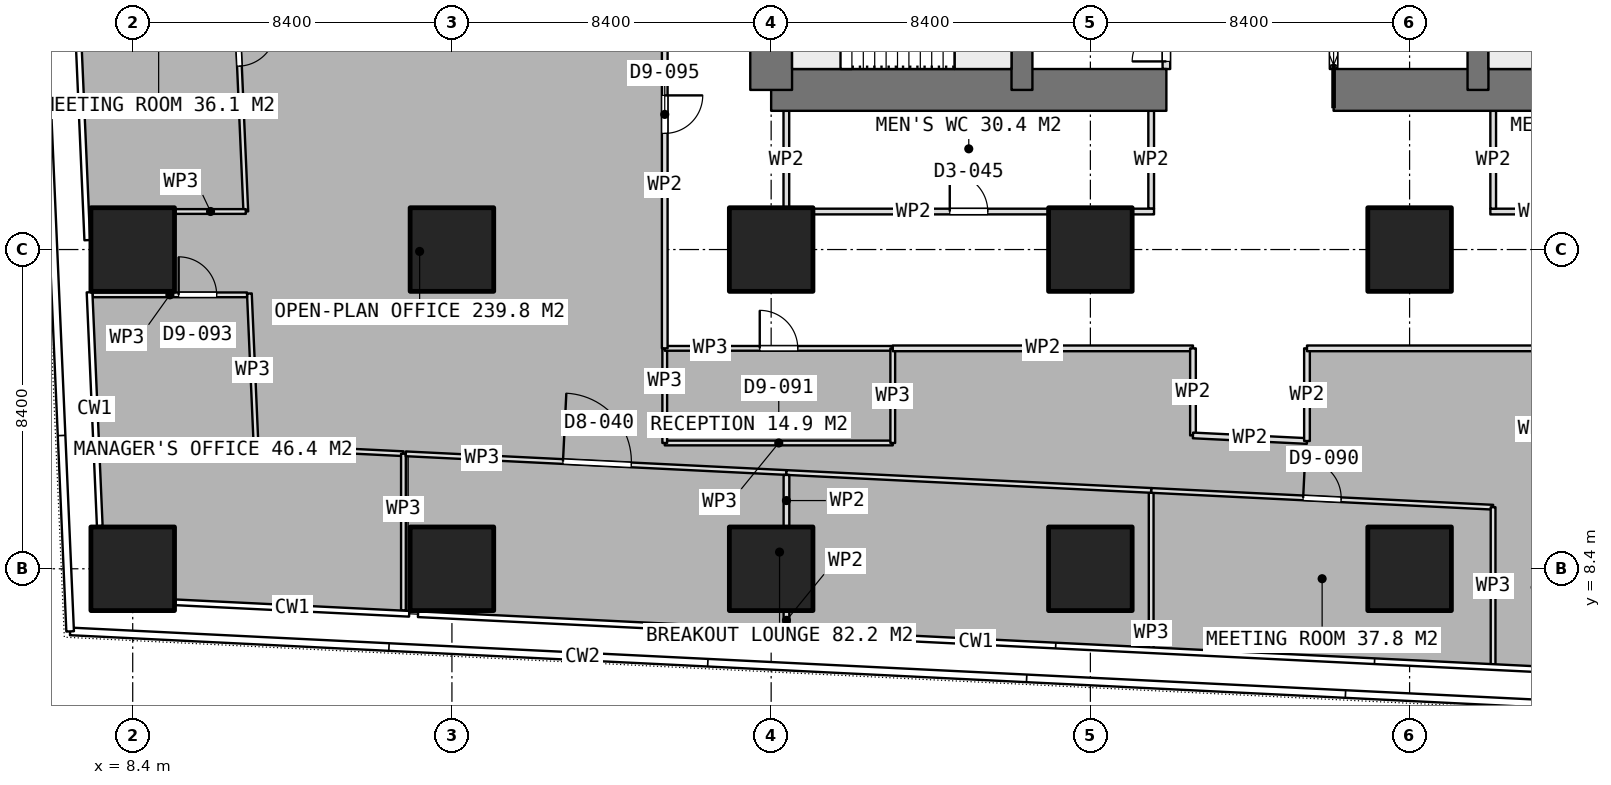
"""IFC4 building model, lengths in metres.
Left out: names, types, materials, properties, quantities, classifications, styles, units other than length and angle.
Written with IfcOpenShell. Run it as: python <this file> out.ifc"""

import sys

from ifc_helpers import new_model, si_unit, direction, frame, frame_2d, origin, origin_2d, place, context, subcontext, project, spatial, rectangle, extrude, element, fill, save


model = new_model("IFC4")
c1 = context("Model", 3, precision=1e-05, world=origin(), true_north=direction((0.0, 1.0)))
c2 = subcontext(c1, "Body", "Model", "MODEL_VIEW")
j1 = project(units=[si_unit("LENGTHUNIT", "METRE"), si_unit("PLANEANGLEUNIT", "RADIAN")], contexts=[c1])
p1 = place(None, origin())
s1 = spatial("IfcSite", under=j1, at=p1, CompositionType="ELEMENT")
p2 = place(p1, origin())
s2 = spatial("IfcBuilding", under=s1, at=p2, CompositionType="ELEMENT")
p3 = place(p2, frame((0.0, 0.0, 40.4)))
s3 = spatial("IfcBuildingStorey", under=s2, at=p3, CompositionType="ELEMENT", Elevation=40.4)
p4 = place(p3, frame((25.2, 21.0, 0.0), z_axis=(0.0, 0.0, 1.0), x_axis=(1.0, 0.0, 0.0)))
e1 = element("IfcWall", 1, at=p4, inside=s3, PredefinedType="SHEAR", context=c2, shape_type="SweptSolid", body=[
    extrude(rectangle(XDim=10.4, YDim=1.1, at=frame_2d((5.2, 0.0))), origin(), (0.0, 0.0, 1.0), 3.75),
])
p5 = place(p3, frame((40.0, 21.0, 0.0), z_axis=(0.0, 0.0, 1.0), x_axis=(1.0, 0.0, 0.0)))
e2 = element("IfcWall", 2, at=p5, inside=s3, PredefinedType="SHEAR", context=c2, shape_type="SweptSolid", body=[
    extrude(rectangle(XDim=10.4, YDim=1.1, at=frame_2d((5.2, 0.0))), origin(), (0.0, 0.0, 1.0), 3.75),
])
p6 = place(p3, frame((25.2, 21.0, 0.0), z_axis=(0.0, 0.0, 1.0), x_axis=(0.0, 1.0, 0.0)))
e3 = element("IfcWall", 3, at=p6, inside=s3, PredefinedType="SHEAR", context=c2, shape_type="SweptSolid", body=[
    extrude(rectangle(XDim=25.2, YDim=1.1, at=frame_2d((12.6, 0.0))), origin(), (0.0, 0.0, 1.0), 3.75),
])
p7 = place(p6, frame((7.8, 0.0, 0.0)))
e4 = element("IfcOpeningElement", 4, at=p7, cuts=e3, PredefinedType="OPENING", context=c2, shape_type="SweptSolid", body=[
    extrude(rectangle(XDim=1.2, YDim=2.1, at=frame_2d((0.6, 1.05))), frame((0.0, 0.56, 0.0), z_axis=(0.0, -1.0, 0.0), x_axis=(1.0, 0.0, 0.0)), (0.0, 0.0, 1.0), 1.12),
])
p8 = place(p6, frame((14.25, 0.0, 0.0)))
e5 = element("IfcOpeningElement", 5, at=p8, cuts=e3, PredefinedType="OPENING", context=c2, shape_type="SweptSolid", body=[
    extrude(rectangle(XDim=0.9, YDim=2.1, at=frame_2d((0.45, 1.05))), frame((0.0, 0.56, 0.0), z_axis=(0.0, -1.0, 0.0), x_axis=(1.0, 0.0, 0.0)), (0.0, 0.0, 1.0), 1.12),
])
p9 = place(p6, frame((16.85, 0.0, 0.0)))
e6 = element("IfcOpeningElement", 6, at=p9, cuts=e3, PredefinedType="OPENING", context=c2, shape_type="SweptSolid", body=[
    extrude(rectangle(XDim=0.9, YDim=2.1, at=frame_2d((0.45, 1.05))), frame((0.0, 0.56, 0.0), z_axis=(0.0, -1.0, 0.0), x_axis=(1.0, 0.0, 0.0)), (0.0, 0.0, 1.0), 1.12),
])
p10 = place(p6, frame((19.075, 0.0, 0.0)))
e7 = element("IfcOpeningElement", 7, at=p10, cuts=e3, PredefinedType="OPENING", context=c2, shape_type="SweptSolid", body=[
    extrude(rectangle(XDim=1.2, YDim=2.1, at=frame_2d((0.6, 1.05))), frame((0.0, 0.56, 0.0), z_axis=(0.0, -1.0, 0.0), x_axis=(1.0, 0.0, 0.0)), (0.0, 0.0, 1.0), 1.12),
])
for number, where, z_axis, x_axis in (
    (8, (31.8, 21.0, 0.0), (0.0, 0.0, 1.0), (0.0, 1.0, 0.0)),
    (9, (43.8, 21.0, 0.0), (0.0, 0.0, 1.0), (0.0, 1.0, 0.0)),
):
    element("IfcWall", number, at=place(p3, frame(where, z_axis=z_axis, x_axis=x_axis)), inside=s3, PredefinedType="SHEAR", context=c2, shape_type="SweptSolid", body=[
        extrude(rectangle(XDim=25.2, YDim=0.55, at=frame_2d((12.6, 0.0))), origin(), (0.0, 0.0, 1.0), 3.75),
    ])
for number, where, z_axis, x_axis in (
    (10, (8.4, 8.4, 0.0), (0.0, 0.0, 1.0), (1.0, 0.0, 0.0)),
    (11, (8.4, 16.8, 0.0), (0.0, 0.0, 1.0), (1.0, 0.0, 0.0)),
    (12, (16.8, 8.4, 0.0), (0.0, 0.0, 1.0), (1.0, 0.0, 0.0)),
    (13, (16.8, 16.8, 0.0), (0.0, 0.0, 1.0), (1.0, 0.0, 0.0)),
    (14, (25.2, 8.4, 0.0), (0.0, 0.0, 1.0), (1.0, 0.0, 0.0)),
    (15, (25.2, 16.8, 0.0), (0.0, 0.0, 1.0), (1.0, 0.0, 0.0)),
    (16, (33.6, 8.4, 0.0), (0.0, 0.0, 1.0), (1.0, 0.0, 0.0)),
    (17, (33.6, 16.8, 0.0), (0.0, 0.0, 1.0), (1.0, 0.0, 0.0)),
    (18, (42.0, 8.4, 0.0), (0.0, 0.0, 1.0), (1.0, 0.0, 0.0)),
    (19, (42.0, 16.8, 0.0), (0.0, 0.0, 1.0), (1.0, 0.0, 0.0)),
):
    element("IfcColumn", number, at=place(p3, frame(where, z_axis=z_axis, x_axis=x_axis)), inside=s3, PredefinedType="COLUMN", context=c2, shape_type="SweptSolid", body=[
        extrude(rectangle(XDim=2.2, YDim=2.2, at=origin_2d()), origin(), (0.0, 0.0, 1.0), 3.75),
    ])
p11 = place(p3, frame((40.0, 21.55, 0.0), z_axis=(0.0, 0.0, 1.0), x_axis=(0.0, 1.0, 0.0)))
e20 = element("IfcWall", 20, at=p11, inside=s3, PredefinedType="PARTITIONING", context=c2, shape_type="SweptSolid", body=[
    extrude(rectangle(XDim=1.575, YDim=0.2, at=frame_2d((0.788, 0.0))), origin(), (0.0, 0.0, 1.0), 3.5),
])
p12 = place(p11, frame((0.1, 0.0, 0.0)))
e21 = element("IfcOpeningElement", 21, at=p12, cuts=e20, PredefinedType="OPENING", context=c2, shape_type="SweptSolid", body=[
    extrude(rectangle(XDim=1.1, YDim=2.1, at=frame_2d((0.55, 1.05))), frame((0.0, 0.11, 0.0), z_axis=(0.0, -1.0, 0.0), x_axis=(1.0, 0.0, 0.0)), (0.0, 0.0, 1.0), 0.22),
])
p13 = place(p3, frame((35.6, 21.55, 0.0), z_axis=(0.0, 0.0, 1.0), x_axis=(0.0, 1.0, 0.0)))
e22 = element("IfcWall", 22, at=p13, inside=s3, PredefinedType="PARTITIONING", context=c2, shape_type="SweptSolid", body=[
    extrude(rectangle(XDim=1.575, YDim=0.2, at=frame_2d((0.788, 0.0))), origin(), (0.0, 0.0, 1.0), 3.5),
])
p14 = place(p13, frame((0.2, 0.0, 0.0)))
e23 = element("IfcOpeningElement", 23, at=p14, cuts=e22, PredefinedType="OPENING", context=c2, shape_type="SweptSolid", body=[
    extrude(rectangle(XDim=0.9, YDim=2.1, at=frame_2d((0.45, 1.05))), frame((0.0, 0.11, 0.0), z_axis=(0.0, -1.0, 0.0), x_axis=(1.0, 0.0, 0.0)), (0.0, 0.0, 1.0), 0.22),
])
p15 = place(p3, frame((25.525, 17.8, 0.0), z_axis=(0.0, 0.0, 1.0), x_axis=(1.0, 0.0, 0.0)))
e24 = element("IfcWall", 24, at=p15, inside=s3, PredefinedType="PARTITIONING", context=c2, shape_type="SweptSolid", body=[
    extrude(rectangle(XDim=9.75, YDim=0.15, at=frame_2d((4.875, 0.0))), origin(), (0.0, 0.0, 1.0), 3.5),
])
p16 = place(p15, frame((4.375, 0.0, 0.0)))
e25 = element("IfcOpeningElement", 25, at=p16, cuts=e24, PredefinedType="OPENING", context=c2, shape_type="SweptSolid", body=[
    extrude(rectangle(XDim=1.0, YDim=2.1, at=frame_2d((0.5, 1.05))), frame((0.0, 0.085, 0.0), z_axis=(0.0, -1.0, 0.0), x_axis=(1.0, 0.0, 0.0)), (0.0, 0.0, 1.0), 0.17),
])
for number, where, z_axis, x_axis in (
    (26, (25.6, 17.875, 0.0), (0.0, 0.0, 1.0), (0.0, 1.0, 0.0)),
    (27, (35.2, 17.875, 0.0), (0.0, 0.0, 1.0), (0.0, 1.0, 0.0)),
):
    element("IfcWall", number, at=place(p3, frame(where, z_axis=z_axis, x_axis=x_axis)), inside=s3, PredefinedType="PARTITIONING", context=c2, shape_type="SweptSolid", body=[
        extrude(rectangle(XDim=2.575, YDim=0.15, at=frame_2d((1.288, 0.0))), origin(), (0.0, 0.0, 1.0), 3.5),
    ])
p17 = place(p3, frame((44.125, 17.8, 0.0), z_axis=(0.0, 0.0, 1.0), x_axis=(1.0, 0.0, 0.0)))
e28 = element("IfcWall", 28, at=p17, inside=s3, PredefinedType="PARTITIONING", context=c2, shape_type="SweptSolid", body=[
    extrude(rectangle(XDim=5.95, YDim=0.15, at=frame_2d((2.975, 0.0))), origin(), (0.0, 0.0, 1.0), 3.5),
])
p18 = place(p17, frame((2.475, 0.0, 0.0)))
e29 = element("IfcOpeningElement", 29, at=p18, cuts=e28, PredefinedType="OPENING", context=c2, shape_type="SweptSolid", body=[
    extrude(rectangle(XDim=1.0, YDim=2.1, at=frame_2d((0.5, 1.05))), frame((0.0, 0.085, 0.0), z_axis=(0.0, -1.0, 0.0), x_axis=(1.0, 0.0, 0.0)), (0.0, 0.0, 1.0), 0.17),
])
p19 = place(p3, frame((44.2, 17.875, 0.0), z_axis=(0.0, 0.0, 1.0), x_axis=(0.0, 1.0, 0.0)))
e30 = element("IfcWall", 30, at=p19, inside=s3, PredefinedType="PARTITIONING", context=c2, shape_type="SweptSolid", body=[
    extrude(rectangle(XDim=2.575, YDim=0.15, at=frame_2d((1.288, 0.0))), origin(), (0.0, 0.0, 1.0), 3.5),
])
p20 = place(p3, frame((35.2, 6.307, 0.0), z_axis=(0.0, 0.0, 1.0), x_axis=(0.0, 1.0, 0.0)))
e31 = element("IfcWall", 31, at=p20, inside=s3, PredefinedType="PARTITIONING", context=c2, shape_type="SweptSolid", body=[
    extrude(rectangle(XDim=4.155, YDim=0.125, at=frame_2d((2.078, 0.0))), origin(), (0.0, 0.0, 1.0), 3.5),
])
p21 = place(p3, frame((35.2, 10.462, 0.0), z_axis=(0.0, 0.0, 1.0), x_axis=(0.998796017558, -0.049056246385, 0.0)))
e32 = element("IfcWall", 32, at=p21, inside=s3, PredefinedType="PARTITIONING", context=c2, shape_type="SweptSolid", body=[
    extrude(rectangle(XDim=9.008, YDim=0.125, at=frame_2d((4.504, 0.0))), origin(), (0.0, 0.0, 1.0), 3.5),
])
p22 = place(p21, frame((4.004, 0.0, 0.0)))
e33 = element("IfcOpeningElement", 33, at=p22, cuts=e32, PredefinedType="OPENING", context=c2, shape_type="SweptSolid", body=[
    extrude(rectangle(XDim=1.0, YDim=2.1, at=frame_2d((0.5, 1.05))), frame((0.0, 0.073, 0.0), z_axis=(0.0, -1.0, 0.0), x_axis=(1.0, 0.0, 0.0)), (0.0, 0.0, 1.0), 0.145),
])
p23 = place(p3, frame((44.197, 10.02, 0.0), z_axis=(0.0, 0.0, 1.0), x_axis=(0.0, -1.0, 0.0)))
e34 = element("IfcWall", 34, at=p23, inside=s3, PredefinedType="PARTITIONING", context=c2, shape_type="SweptSolid", body=[
    extrude(rectangle(XDim=4.155, YDim=0.125, at=frame_2d((2.078, 0.0))), origin(), (0.0, 0.0, 1.0), 3.5),
])
p24 = place(p3, frame((10.997, 26.449, 0.0), z_axis=(0.0, 0.0, 1.0), x_axis=(0.043772583163, -0.999041521141, 0.0)))
e35 = element("IfcWall", 35, at=p24, inside=s3, PredefinedType="PARTITIONING", context=c2, shape_type="SweptSolid", body=[
    extrude(rectangle(XDim=8.656, YDim=0.125, at=frame_2d((4.328, 0.0))), origin(), (0.0, 0.0, 1.0), 3.5),
])
p25 = place(p24, frame((3.828, 0.0, 0.0)))
e36 = element("IfcOpeningElement", 36, at=p25, cuts=e35, PredefinedType="OPENING", context=c2, shape_type="SweptSolid", body=[
    extrude(rectangle(XDim=1.0, YDim=2.1, at=frame_2d((0.5, 1.05))), frame((0.0, 0.073, 0.0), z_axis=(0.0, -1.0, 0.0), x_axis=(1.0, 0.0, 0.0)), (0.0, 0.0, 1.0), 0.145),
])
p26 = place(p3, frame((11.376, 17.801, 0.0), z_axis=(0.0, 0.0, 1.0), x_axis=(-1.0, 0.0, 0.0)))
e37 = element("IfcWall", 37, at=p26, inside=s3, PredefinedType="PARTITIONING", context=c2, shape_type="SweptSolid", body=[
    extrude(rectangle(XDim=1.856, YDim=0.125, at=frame_2d((0.928, 0.0))), origin(), (0.0, 0.0, 1.0), 3.5),
])
p27 = place(p3, frame((11.47, 15.643, 0.0), z_axis=(0.0, 0.0, 1.0), x_axis=(0.043689667834, -0.999045150594, 0.0)))
e38 = element("IfcWall", 38, at=p27, inside=s3, PredefinedType="PARTITIONING", context=c2, shape_type="SweptSolid", body=[
    extrude(rectangle(XDim=4.029, YDim=0.125, at=frame_2d((2.015, 0.0))), origin(), (0.0, 0.0, 1.0), 3.5),
])
p28 = place(p3, frame((11.646, 11.618, 0.0), z_axis=(0.0, 0.0, 1.0), x_axis=(0.998802628605, -0.048921458389, 0.0)))
e39 = element("IfcWall", 39, at=p28, inside=s3, PredefinedType="PARTITIONING", context=c2, shape_type="SweptSolid", body=[
    extrude(rectangle(XDim=3.883, YDim=0.125, at=frame_2d((1.941, 0.0))), origin(), (0.0, 0.0, 1.0), 3.5),
])
p29 = place(p3, frame((15.524, 11.428, 0.0), z_axis=(0.0, 0.0, 1.0), x_axis=(0.0, -1.0, 0.0)))
e40 = element("IfcWall", 40, at=p29, inside=s3, PredefinedType="PARTITIONING", context=c2, shape_type="SweptSolid", body=[
    extrude(rectangle(XDim=4.125, YDim=0.125, at=frame_2d((2.062, 0.0))), origin(), (0.0, 0.0, 1.0), 3.5),
])
p30 = place(p3, frame((7.347, 15.608, 0.0), z_axis=(0.0, 0.0, 1.0), x_axis=(1.0, 0.0, 0.0)))
e41 = element("IfcWall", 41, at=p30, inside=s3, PredefinedType="PARTITIONING", context=c2, shape_type="SweptSolid", body=[
    extrude(rectangle(XDim=4.062, YDim=0.125, at=frame_2d((2.031, 0.0))), origin(), (0.0, 0.0, 1.0), 3.5),
])
p31 = place(p30, frame((2.262, 0.0, 0.0)))
e42 = element("IfcOpeningElement", 42, at=p31, cuts=e41, PredefinedType="OPENING", context=c2, shape_type="SweptSolid", body=[
    extrude(rectangle(XDim=1.0, YDim=2.1, at=frame_2d((0.5, 1.05))), frame((0.0, 0.073, 0.0), z_axis=(0.0, -1.0, 0.0), x_axis=(1.0, 0.0, 0.0)), (0.0, 0.0, 1.0), 0.145),
])
p32 = place(p3, frame((15.586, 11.425, 0.0), z_axis=(0.0, 0.0, 1.0), x_axis=(0.998795792239, -0.049060833732, 0.0)))
e43 = element("IfcWall", 43, at=p32, inside=s3, PredefinedType="PARTITIONING", context=c2, shape_type="SweptSolid", body=[
    extrude(rectangle(XDim=10.027, YDim=0.125, at=frame_2d((5.014, 0.0))), origin(), (0.0, 0.0, 1.0), 3.5),
])
p33 = place(p32, frame((4.141, 0.0, 0.0)))
e44 = element("IfcOpeningElement", 44, at=p33, cuts=e43, PredefinedType="OPENING", context=c2, shape_type="SweptSolid", body=[
    extrude(rectangle(XDim=1.8, YDim=2.1, at=frame_2d((0.9, 1.05))), frame((0.0, 0.073, 0.0), z_axis=(0.0, -1.0, 0.0), x_axis=(1.0, 0.0, 0.0)), (0.0, 0.0, 1.0), 0.145),
])
p34 = place(p3, frame((25.601, 10.933, 0.0), z_axis=(0.0, 0.0, 1.0), x_axis=(0.998797103995, -0.049034121301, 0.0)))
e45 = element("IfcWall", 45, at=p34, inside=s3, PredefinedType="PARTITIONING", context=c2, shape_type="SweptSolid", body=[
    extrude(rectangle(XDim=9.609, YDim=0.125, at=frame_2d((4.805, 0.0))), origin(), (0.0, 0.0, 1.0), 3.5),
])
p35 = place(p3, frame((28.4, 11.71, 0.0), z_axis=(0.0, 0.0, 1.0), x_axis=(-1.0, 0.0, 0.0)))
e46 = element("IfcWall", 46, at=p35, inside=s3, PredefinedType="PARTITIONING", context=c2, shape_type="SweptSolid", body=[
    extrude(rectangle(XDim=6.0, YDim=0.125, at=frame_2d((3.0, 0.0))), origin(), (0.0, 0.0, 1.0), 3.5),
])
p36 = place(p3, frame((22.4, 11.71, 0.0), z_axis=(0.0, 0.0, 1.0), x_axis=(0.0, 1.0, 0.0)))
e47 = element("IfcWall", 47, at=p36, inside=s3, PredefinedType="PARTITIONING", context=c2, shape_type="SweptSolid", body=[
    extrude(rectangle(XDim=2.49, YDim=0.125, at=frame_2d((1.245, 0.0))), origin(), (0.0, 0.0, 1.0), 3.5),
])
p37 = place(p3, frame((22.4, 14.2, 0.0), z_axis=(0.0, 0.0, 1.0), x_axis=(1.0, 0.0, 0.0)))
e48 = element("IfcWall", 48, at=p37, inside=s3, PredefinedType="PARTITIONING", context=c2, shape_type="SweptSolid", body=[
    extrude(rectangle(XDim=6.0, YDim=0.125, at=frame_2d((3.0, 0.0))), origin(), (0.0, 0.0, 1.0), 3.5),
])
p38 = place(p37, frame((2.5, 0.0, 0.0)))
e49 = element("IfcOpeningElement", 49, at=p38, cuts=e48, PredefinedType="OPENING", context=c2, shape_type="SweptSolid", body=[
    extrude(rectangle(XDim=1.0, YDim=2.1, at=frame_2d((0.5, 1.05))), frame((0.0, 0.073, 0.0), z_axis=(0.0, -1.0, 0.0), x_axis=(1.0, 0.0, 0.0)), (0.0, 0.0, 1.0), 0.145),
])
p39 = place(p3, frame((28.4, 14.2, 0.0), z_axis=(0.0, 0.0, 1.0), x_axis=(0.0, -1.0, 0.0)))
e50 = element("IfcWall", 50, at=p39, inside=s3, PredefinedType="PARTITIONING", context=c2, shape_type="SweptSolid", body=[
    extrude(rectangle(XDim=2.49, YDim=0.125, at=frame_2d((1.245, 0.0))), origin(), (0.0, 0.0, 1.0), 3.5),
])
p40 = place(p3, frame((22.4, 26.512, 0.0), z_axis=(0.0, 0.0, 1.0), x_axis=(0.0, -1.0, 0.0)))
e51 = element("IfcWall", 51, at=p40, inside=s3, PredefinedType="PARTITIONING", context=c2, shape_type="SweptSolid", body=[
    extrude(rectangle(XDim=12.312, YDim=0.15, at=frame_2d((6.156, 0.0))), origin(), (0.0, 0.0, 1.0), 3.5),
])
p41 = place(p40, frame((5.656, 0.0, 0.0)))
e52 = element("IfcOpeningElement", 52, at=p41, cuts=e51, PredefinedType="OPENING", context=c2, shape_type="SweptSolid", body=[
    extrude(rectangle(XDim=1.0, YDim=2.1, at=frame_2d((0.5, 1.05))), frame((0.0, 0.085, 0.0), z_axis=(0.0, -1.0, 0.0), x_axis=(1.0, 0.0, 0.0)), (0.0, 0.0, 1.0), 0.17),
])
p42 = place(p3, frame((28.4, 14.2, 0.0), z_axis=(0.0, 0.0, 1.0), x_axis=(1.0, 0.0, 0.0)))
e53 = element("IfcWall", 53, at=p42, inside=s3, PredefinedType="PARTITIONING", context=c2, shape_type="SweptSolid", body=[
    extrude(rectangle(XDim=7.9, YDim=0.15, at=frame_2d((3.95, 0.0))), origin(), (0.0, 0.0, 1.0), 3.5),
])
p43 = place(p3, frame((36.3, 14.2, 0.0), z_axis=(0.0, 0.0, 1.0), x_axis=(0.0, -1.0, 0.0)))
e54 = element("IfcWall", 54, at=p43, inside=s3, PredefinedType="PARTITIONING", context=c2, shape_type="SweptSolid", body=[
    extrude(rectangle(XDim=2.291, YDim=0.15, at=frame_2d((1.146, 0.0))), origin(), (0.0, 0.0, 1.0), 3.5),
])
p44 = place(p3, frame((36.3, 11.909, 0.0), z_axis=(0.0, 0.0, 1.0), x_axis=(0.998802102454, -0.048932199355, 0.0)))
e55 = element("IfcWall", 55, at=p44, inside=s3, PredefinedType="PARTITIONING", context=c2, shape_type="SweptSolid", body=[
    extrude(rectangle(XDim=3.004, YDim=0.15, at=frame_2d((1.502, 0.0))), origin(), (0.0, 0.0, 1.0), 3.5),
])
p45 = place(p3, frame((39.3, 11.762, 0.0), z_axis=(0.0, 0.0, 1.0), x_axis=(0.0, 1.0, 0.0)))
e56 = element("IfcWall", 56, at=p45, inside=s3, PredefinedType="PARTITIONING", context=c2, shape_type="SweptSolid", body=[
    extrude(rectangle(XDim=2.438, YDim=0.15, at=frame_2d((1.219, 0.0))), origin(), (0.0, 0.0, 1.0), 3.5),
])
p46 = place(p3, frame((39.3, 14.2, 0.0), z_axis=(0.0, 0.0, 1.0), x_axis=(1.0, 0.0, 0.0)))
e57 = element("IfcWall", 57, at=p46, inside=s3, PredefinedType="PARTITIONING", context=c2, shape_type="SweptSolid", body=[
    extrude(rectangle(XDim=6.004, YDim=0.15, at=frame_2d((3.002, 0.0))), origin(), (0.0, 0.0, 1.0), 3.5),
])
p47 = place(p3, frame((25.603, 10.87, 0.0), z_axis=(0.0, 0.0, 1.0), x_axis=(0.0, -1.0, 0.0)))
e58 = element("IfcWall", 58, at=p47, inside=s3, PredefinedType="PARTITIONING", context=c2, shape_type="SweptSolid", body=[
    extrude(rectangle(XDim=1.35, YDim=0.15, at=frame_2d((0.675, 0.0))), origin(), (0.0, 0.0, 1.0), 3.5),
])
p48 = place(p3, frame((25.603, 7.28, 0.0), z_axis=(0.0, 0.0, 1.0), x_axis=(0.0, -1.0, 0.0)))
e59 = element("IfcWall", 59, at=p48, inside=s3, PredefinedType="PARTITIONING", context=c2, shape_type="SweptSolid", body=[
    extrude(rectangle(XDim=0.472, YDim=0.15, at=frame_2d((0.236, 0.0))), origin(), (0.0, 0.0, 1.0), 3.5),
])
p49 = place(p12, origin())
e60 = element("IfcDoor", 60, at=p49, inside=s3, OperationType="SLIDING_TO_LEFT", PredefinedType="DOOR", context=c2, shape_type="SweptSolid", body=[
    extrude(rectangle(XDim=1.1, YDim=2.1, at=frame_2d((0.55, 1.05))), frame((0.0, 0.025, 0.0), z_axis=(0.0, -1.0, 0.0), x_axis=(1.0, 0.0, 0.0)), (0.0, 0.0, 1.0), 0.05),
])
fill(e21, e60)
p50 = place(p14, origin())
e61 = element("IfcDoor", 61, at=p50, inside=s3, OperationType="SINGLE_SWING_LEFT", PredefinedType="DOOR", context=c2, shape_type="SweptSolid", body=[
    extrude(rectangle(XDim=0.9, YDim=2.1, at=frame_2d((0.45, 1.05))), frame((0.0, 0.025, 0.0), z_axis=(0.0, -1.0, 0.0), x_axis=(1.0, 0.0, 0.0)), (0.0, 0.0, 1.0), 0.05),
])
fill(e23, e61)
p51 = place(p16, origin())
e62 = element("IfcDoor", 62, at=p51, inside=s3, OperationType="SINGLE_SWING_LEFT", PredefinedType="DOOR", context=c2, shape_type="SweptSolid", body=[
    extrude(rectangle(XDim=1.0, YDim=2.1, at=frame_2d((0.5, 1.05))), frame((0.0, 0.025, 0.0), z_axis=(0.0, -1.0, 0.0), x_axis=(1.0, 0.0, 0.0)), (0.0, 0.0, 1.0), 0.05),
])
fill(e25, e62)
p52 = place(p22, origin())
e63 = element("IfcDoor", 63, at=p52, inside=s3, OperationType="SINGLE_SWING_LEFT", PredefinedType="DOOR", context=c2, shape_type="SweptSolid", body=[
    extrude(rectangle(XDim=1.0, YDim=2.1, at=frame_2d((0.5, 1.05))), frame((0.0, 0.025, 0.0), z_axis=(0.0, -1.0, 0.0), x_axis=(1.0, 0.0, 0.0)), (0.0, 0.0, 1.0), 0.05),
])
fill(e33, e63)
p53 = place(p25, origin())
e64 = element("IfcDoor", 64, at=p53, inside=s3, OperationType="SINGLE_SWING_LEFT", PredefinedType="DOOR", context=c2, shape_type="SweptSolid", body=[
    extrude(rectangle(XDim=1.0, YDim=2.1, at=frame_2d((0.5, 1.05))), frame((0.0, 0.025, 0.0), z_axis=(0.0, -1.0, 0.0), x_axis=(1.0, 0.0, 0.0)), (0.0, 0.0, 1.0), 0.05),
])
fill(e36, e64)
p54 = place(p31, origin())
e65 = element("IfcDoor", 65, at=p54, inside=s3, OperationType="SINGLE_SWING_LEFT", PredefinedType="DOOR", context=c2, shape_type="SweptSolid", body=[
    extrude(rectangle(XDim=1.0, YDim=2.1, at=frame_2d((0.5, 1.05))), frame((0.0, 0.025, 0.0), z_axis=(0.0, -1.0, 0.0), x_axis=(1.0, 0.0, 0.0)), (0.0, 0.0, 1.0), 0.05),
])
fill(e42, e65)
p55 = place(p33, origin())
e66 = element("IfcDoor", 66, at=p55, inside=s3, OperationType="DOUBLE_DOOR_SINGLE_SWING", PredefinedType="DOOR", context=c2, shape_type="SweptSolid", body=[
    extrude(rectangle(XDim=1.8, YDim=2.1, at=frame_2d((0.9, 1.05))), frame((0.0, 0.025, 0.0), z_axis=(0.0, -1.0, 0.0), x_axis=(1.0, 0.0, 0.0)), (0.0, 0.0, 1.0), 0.05),
])
fill(e44, e66)
p56 = place(p38, origin())
e67 = element("IfcDoor", 67, at=p56, inside=s3, OperationType="SINGLE_SWING_LEFT", PredefinedType="DOOR", context=c2, shape_type="SweptSolid", body=[
    extrude(rectangle(XDim=1.0, YDim=2.1, at=frame_2d((0.5, 1.05))), frame((0.0, 0.025, 0.0), z_axis=(0.0, -1.0, 0.0), x_axis=(1.0, 0.0, 0.0)), (0.0, 0.0, 1.0), 0.05),
])
fill(e49, e67)
p57 = place(p41, origin())
e68 = element("IfcDoor", 68, at=p57, inside=s3, OperationType="SINGLE_SWING_LEFT", PredefinedType="DOOR", context=c2, shape_type="SweptSolid", body=[
    extrude(rectangle(XDim=1.0, YDim=2.1, at=frame_2d((0.5, 1.05))), frame((0.0, 0.025, 0.0), z_axis=(0.0, -1.0, 0.0), x_axis=(1.0, 0.0, 0.0)), (0.0, 0.0, 1.0), 0.05),
])
fill(e52, e68)
save(model, sys.argv[1])
